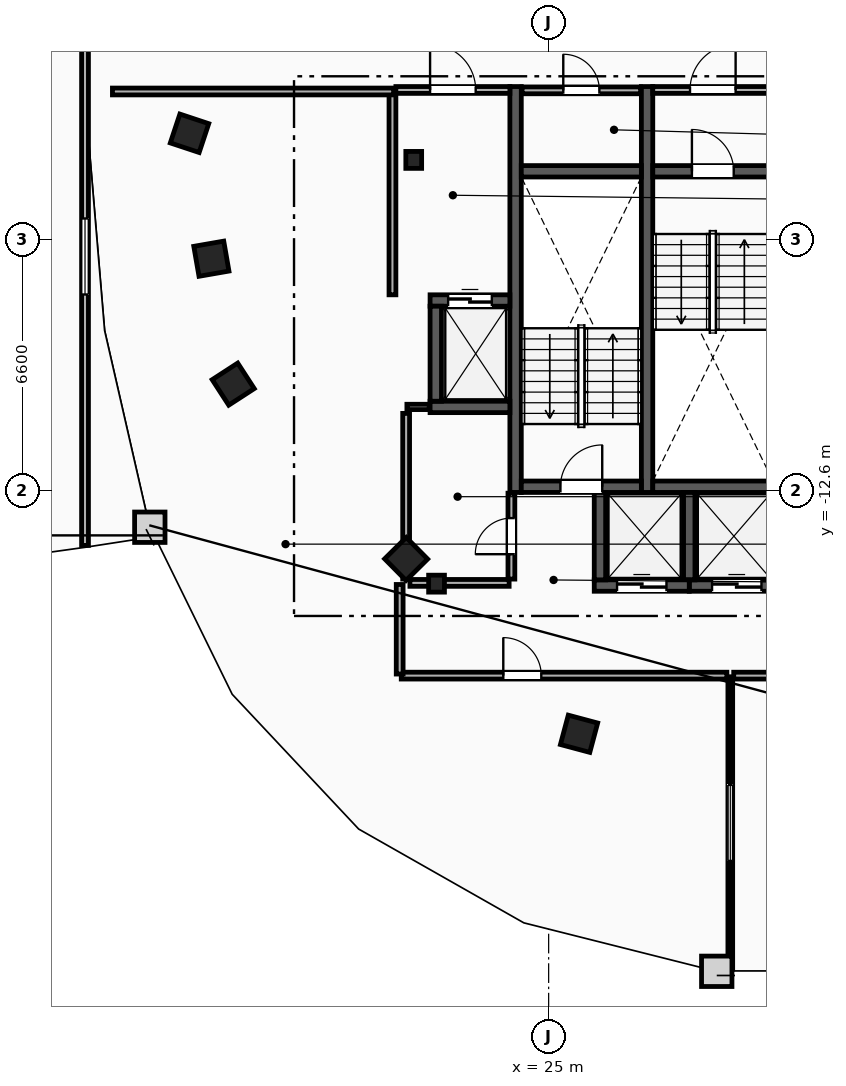
"""IFC4 building model, lengths in metres.
Left out: names, types, materials, properties, quantities, classifications, styles, units other than length and angle.
Written with IfcOpenShell. Run it as: python <this file> out.ifc"""

import sys

from ifc_helpers import new_model, si_unit, direction, frame, frame_2d, origin, origin_2d, place, context, subcontext, project, spatial, rectangle, i_section, extrude, element, fill, save


model = new_model("IFC4")
c1 = context("Model", 3, precision=1e-05, world=origin(), true_north=direction((0.0, 1.0)))
c2 = subcontext(c1, "Body", "Model", "MODEL_VIEW")
j1 = project(units=[si_unit("LENGTHUNIT", "METRE"), si_unit("PLANEANGLEUNIT", "RADIAN")], contexts=[c1])
p1 = place(None, origin())
s1 = spatial("IfcSite", under=j1, at=p1, CompositionType="ELEMENT")
p2 = place(p1, origin())
s2 = spatial("IfcBuilding", under=s1, at=p2, CompositionType="ELEMENT")
p3 = place(p2, frame((0.0, 0.0, 257.6)))
s3 = spatial("IfcBuildingStorey", under=s2, at=p3, CompositionType="ELEMENT", Elevation=257.6)
for number, where, z_axis, x_axis in (
    (1, (21.45, -3.9, 0.0), (0.0, 0.0, 1.0), (1.0, 0.0, 0.0)),
    (2, (22.05, -15.05, 0.0), (0.0, 0.0, 1.0), (1.0, 0.0, 0.0)),
):
    element("IfcColumn", number, at=place(p3, frame(where, z_axis=z_axis, x_axis=x_axis)), inside=s3, PredefinedType="COLUMN", context=c2, shape_type="SweptSolid", body=[
        extrude(i_section(OverallWidth=0.416, OverallDepth=0.446, WebThickness=0.039, FlangeThickness=0.063, FilletRadius=0.018, at=origin_2d()), origin(), (0.0, 0.0, 1.0), 3.6),
    ])
for number, where, z_axis, x_axis in (
    (3, (15.55, -3.2, 0.0), (0.0, 0.0, 1.0), (-0.315, -0.949, 0.0)),
    (4, (16.125, -6.5, 0.0), (0.0, 0.0, 1.0), (0.172, -0.985, 0.0)),
    (5, (16.7, -9.8, 0.0), (0.0, 0.0, 1.0), (0.544, -0.839, 0.0)),
    (6, (21.25, -14.4, 0.0), (0.0, 0.0, 1.0), (0.703, -0.711, 0.0)),
    (7, (25.8, -19.0, 0.0), (0.0, 0.0, 1.0), (0.966, -0.259, 0.0)),
):
    element("IfcColumn", number, at=place(p3, frame(where, z_axis=z_axis, x_axis=x_axis)), inside=s3, PredefinedType="COLUMN", context=c2, shape_type="SweptSolid", body=[
        extrude(rectangle(XDim=0.8, YDim=0.8, at=origin_2d()), origin(), (0.0, 0.0, 1.0), 3.6),
    ])
for number, where, z_axis, x_axis in (
    (8, (27.59, -12.65, 0.0), (0.0, 0.0, 1.0), (0.0, 1.0, 0.0)),
    (9, (24.13, -12.65, 0.0), (0.0, 0.0, 1.0), (0.0, 1.0, 0.0)),
):
    element("IfcWall", number, at=place(p3, frame(where, z_axis=z_axis, x_axis=x_axis)), inside=s3, PredefinedType="SHEAR", context=c2, shape_type="SweptSolid", body=[
        extrude(rectangle(XDim=10.68, YDim=0.3, at=frame_2d((5.34, 0.0))), origin(), (0.0, 0.0, 1.0), 3.34),
    ])
p4 = place(p3, frame((27.74, -4.2, 0.0), z_axis=(0.0, 0.0, 1.0), x_axis=(1.0, 0.0, 0.0)))
e10 = element("IfcWall", 10, at=p4, inside=s3, PredefinedType="SHEAR", context=c2, shape_type="SweptSolid", body=[
    extrude(rectangle(XDim=3.16, YDim=0.3, at=frame_2d((1.58, 0.0))), origin(), (0.0, 0.0, 1.0), 3.34),
])
p5 = place(p4, frame((1.03, 0.0, 0.0)))
e11 = element("IfcOpeningElement", 11, at=p5, cuts=e10, PredefinedType="OPENING", context=c2, shape_type="SweptSolid", body=[
    extrude(rectangle(XDim=1.1, YDim=2.15, at=frame_2d((0.55, 1.075))), frame((0.0, 0.16, 0.0), z_axis=(0.0, -1.0, 0.0), x_axis=(1.0, 0.0, 0.0)), (0.0, 0.0, 1.0), 0.32),
])
p6 = place(p3, frame((27.74, -12.5, 0.0), z_axis=(0.0, 0.0, 1.0), x_axis=(1.0, 0.0, 0.0)))
e12 = element("IfcWall", 12, at=p6, inside=s3, PredefinedType="SHEAR", context=c2, shape_type="SweptSolid", body=[
    extrude(rectangle(XDim=3.16, YDim=0.3, at=frame_2d((1.58, 0.0))), origin(), (0.0, 0.0, 1.0), 3.34),
])
p7 = place(p3, frame((24.28, -12.5, 0.0), z_axis=(0.0, 0.0, 1.0), x_axis=(1.0, 0.0, 0.0)))
e13 = element("IfcWall", 13, at=p7, inside=s3, PredefinedType="SHEAR", context=c2, shape_type="SweptSolid", body=[
    extrude(rectangle(XDim=3.16, YDim=0.3, at=frame_2d((1.58, 0.0))), origin(), (0.0, 0.0, 1.0), 3.34),
])
p8 = place(p7, frame((1.03, 0.0, 0.0)))
e14 = element("IfcOpeningElement", 14, at=p8, cuts=e13, PredefinedType="OPENING", context=c2, shape_type="SweptSolid", body=[
    extrude(rectangle(XDim=1.1, YDim=2.15, at=frame_2d((0.55, 1.075))), frame((0.0, 0.16, 0.0), z_axis=(0.0, -1.0, 0.0), x_axis=(1.0, 0.0, 0.0)), (0.0, 0.0, 1.0), 0.32),
])
p9 = place(p3, frame((24.28, -4.2, 0.0), z_axis=(0.0, 0.0, 1.0), x_axis=(1.0, 0.0, 0.0)))
e15 = element("IfcWall", 15, at=p9, inside=s3, PredefinedType="SHEAR", context=c2, shape_type="SweptSolid", body=[
    extrude(rectangle(XDim=3.16, YDim=0.3, at=frame_2d((1.58, 0.0))), origin(), (0.0, 0.0, 1.0), 3.34),
])
p10 = place(p3, frame((20.89, -7.45, 0.0), z_axis=(0.0, 0.0, 1.0), x_axis=(0.0, 1.0, 0.0)))
e16 = element("IfcWall", 16, at=p10, inside=s3, PredefinedType="PARTITIONING", context=c2, shape_type="SweptSolid", body=[
    extrude(rectangle(XDim=5.3, YDim=0.18, at=frame_2d((2.65, 0.0))), origin(), (0.0, 0.0, 1.0), 3.34),
])
p11 = place(p3, frame((20.98, -2.06, 0.0), z_axis=(0.0, 0.0, 1.0), x_axis=(1.0, 0.0, 0.0)))
e17 = element("IfcWall", 17, at=p11, inside=s3, PredefinedType="PARTITIONING", context=c2, shape_type="SweptSolid", body=[
    extrude(rectangle(XDim=3.0, YDim=0.18, at=frame_2d((1.5, 0.0))), origin(), (0.0, 0.0, 1.0), 3.34),
])
p12 = place(p11, frame((0.9, 0.0, 0.0)))
e18 = element("IfcOpeningElement", 18, at=p12, cuts=e17, PredefinedType="OPENING", context=c2, shape_type="SweptSolid", body=[
    extrude(rectangle(XDim=1.2, YDim=2.15, at=frame_2d((0.6, 1.075))), frame((0.0, 0.1, 0.0), z_axis=(0.0, -1.0, 0.0), x_axis=(1.0, 0.0, 0.0)), (0.0, 0.0, 1.0), 0.2),
])
p13 = place(p3, frame((27.74, -2.06, 0.0), z_axis=(0.0, 0.0, 1.0), x_axis=(1.0, 0.0, 0.0)))
e19 = element("IfcWall", 19, at=p13, inside=s3, PredefinedType="PARTITIONING", context=c2, shape_type="SweptSolid", body=[
    extrude(rectangle(XDim=3.16, YDim=0.18, at=frame_2d((1.58, 0.0))), origin(), (0.0, 0.0, 1.0), 3.34),
])
p14 = place(p13, frame((0.98, 0.0, 0.0)))
e20 = element("IfcOpeningElement", 20, at=p14, cuts=e19, PredefinedType="OPENING", context=c2, shape_type="SweptSolid", body=[
    extrude(rectangle(XDim=1.2, YDim=2.15, at=frame_2d((0.6, 1.075))), frame((0.0, 0.1, 0.0), z_axis=(0.0, -1.0, 0.0), x_axis=(1.0, 0.0, 0.0)), (0.0, 0.0, 1.0), 0.2),
])
p15 = place(p3, frame((21.88, -7.6, 0.0), z_axis=(0.0, 0.0, 1.0), x_axis=(1.0, 0.0, 0.0)))
e21 = element("IfcWall", 21, at=p15, inside=s3, PredefinedType="SHEAR", context=c2, shape_type="SweptSolid", body=[
    extrude(rectangle(XDim=2.1, YDim=0.3, at=frame_2d((1.05, 0.0))), origin(), (0.0, 0.0, 1.0), 3.34),
])
p16 = place(p15, frame((0.475, 0.0, 0.0)))
e22 = element("IfcOpeningElement", 22, at=p16, cuts=e21, PredefinedType="OPENING", context=c2, shape_type="SweptSolid", body=[
    extrude(rectangle(XDim=1.15, YDim=2.2, at=frame_2d((0.575, 1.1))), frame((0.0, 0.16, 0.0), z_axis=(0.0, -1.0, 0.0), x_axis=(1.0, 0.0, 0.0)), (0.0, 0.0, 1.0), 0.32),
])
p17 = place(p3, frame((21.88, -10.4, 0.0), z_axis=(0.0, 0.0, 1.0), x_axis=(1.0, 0.0, 0.0)))
e23 = element("IfcWall", 23, at=p17, inside=s3, PredefinedType="SHEAR", context=c2, shape_type="SweptSolid", body=[
    extrude(rectangle(XDim=2.1, YDim=0.3, at=frame_2d((1.05, 0.0))), origin(), (0.0, 0.0, 1.0), 3.34),
])
p18 = place(p3, frame((22.03, -10.25, 0.0), z_axis=(0.0, 0.0, 1.0), x_axis=(0.0, 1.0, 0.0)))
e24 = element("IfcWall", 24, at=p18, inside=s3, PredefinedType="SHEAR", context=c2, shape_type="SweptSolid", body=[
    extrude(rectangle(XDim=2.5, YDim=0.3, at=frame_2d((1.25, 0.0))), origin(), (0.0, 0.0, 1.0), 3.34),
])
p19 = place(p3, frame((28.7, -15.1, 0.0), z_axis=(0.0, 0.0, 1.0), x_axis=(1.0, 0.0, 0.0)))
e25 = element("IfcWall", 25, at=p19, inside=s3, PredefinedType="SHEAR", context=c2, shape_type="SweptSolid", body=[
    extrude(rectangle(XDim=2.5, YDim=0.3, at=frame_2d((1.25, 0.0))), origin(), (0.0, 0.0, 1.0), 3.34),
])
p20 = place(p19, frame((0.6, 0.0, 0.0)))
e26 = element("IfcOpeningElement", 26, at=p20, cuts=e25, PredefinedType="OPENING", context=c2, shape_type="SweptSolid", body=[
    extrude(rectangle(XDim=1.3, YDim=2.2, at=frame_2d((0.65, 1.1))), frame((0.0, 0.16, 0.0), z_axis=(0.0, -1.0, 0.0), x_axis=(1.0, 0.0, 0.0)), (0.0, 0.0, 1.0), 0.32),
])
p21 = place(p3, frame((28.7, -14.95, 0.0), z_axis=(0.0, 0.0, 1.0), x_axis=(0.0, 1.0, 0.0)))
e27 = element("IfcWall", 27, at=p21, inside=s3, PredefinedType="SHEAR", context=c2, shape_type="SweptSolid", body=[
    extrude(rectangle(XDim=2.3, YDim=0.3, at=frame_2d((1.15, 0.0))), origin(), (0.0, 0.0, 1.0), 3.34),
])
p22 = place(p3, frame((26.2, -15.1, 0.0), z_axis=(0.0, 0.0, 1.0), x_axis=(1.0, 0.0, 0.0)))
e28 = element("IfcWall", 28, at=p22, inside=s3, PredefinedType="SHEAR", context=c2, shape_type="SweptSolid", body=[
    extrude(rectangle(XDim=2.5, YDim=0.3, at=frame_2d((1.25, 0.0))), origin(), (0.0, 0.0, 1.0), 3.34),
])
p23 = place(p22, frame((0.6, 0.0, 0.0)))
e29 = element("IfcOpeningElement", 29, at=p23, cuts=e28, PredefinedType="OPENING", context=c2, shape_type="SweptSolid", body=[
    extrude(rectangle(XDim=1.3, YDim=2.2, at=frame_2d((0.65, 1.1))), frame((0.0, 0.16, 0.0), z_axis=(0.0, -1.0, 0.0), x_axis=(1.0, 0.0, 0.0)), (0.0, 0.0, 1.0), 0.32),
])
p24 = place(p3, frame((26.35, -14.95, 0.0), z_axis=(0.0, 0.0, 1.0), x_axis=(0.0, 1.0, 0.0)))
e30 = element("IfcWall", 30, at=p24, inside=s3, PredefinedType="SHEAR", context=c2, shape_type="SweptSolid", body=[
    extrude(rectangle(XDim=2.3, YDim=0.3, at=frame_2d((1.15, 0.0))), origin(), (0.0, 0.0, 1.0), 3.34),
])
p25 = place(p3, frame((21.27, -10.4, 0.0), z_axis=(0.0, 0.0, 1.0), x_axis=(1.0, 0.0, 0.0)))
e31 = element("IfcWall", 31, at=p25, inside=s3, PredefinedType="PARTITIONING", context=c2, shape_type="SweptSolid", body=[
    extrude(rectangle(XDim=0.59, YDim=0.14, at=frame_2d((0.295, 0.0))), origin(), (0.0, 0.0, 1.0), 3.34),
])
p26 = place(p3, frame((21.25, -14.93, 0.0), z_axis=(0.0, 0.0, 1.0), x_axis=(0.0, 1.0, 0.0)))
e32 = element("IfcWall", 32, at=p26, inside=s3, PredefinedType="PARTITIONING", context=c2, shape_type="SweptSolid", body=[
    extrude(rectangle(XDim=4.36, YDim=0.18, at=frame_2d((2.18, 0.0))), origin(), (0.0, 0.0, 1.0), 3.34),
])
p27 = place(p3, frame((21.35, -15.03, 0.0), z_axis=(0.0, 0.0, 1.0), x_axis=(1.0, 0.0, 0.0)))
e33 = element("IfcWall", 33, at=p27, inside=s3, PredefinedType="PARTITIONING", context=c2, shape_type="SweptSolid", body=[
    extrude(rectangle(XDim=2.61, YDim=0.18, at=frame_2d((1.305, 0.0))), origin(), (0.0, 0.0, 1.0), 2.413),
])
p28 = place(p3, frame((24.3, -2.07, 0.0), z_axis=(0.0, 0.0, 1.0), x_axis=(1.0, 0.0, 0.0)))
e34 = element("IfcWall", 34, at=p28, inside=s3, PredefinedType="PARTITIONING", context=c2, shape_type="SweptSolid", body=[
    extrude(rectangle(XDim=3.12, YDim=0.18, at=frame_2d((1.56, 0.0))), origin(), (0.0, 0.0, 1.0), 3.34),
])
p29 = place(p28, frame((1.085, 0.0, 0.0)))
e35 = element("IfcOpeningElement", 35, at=p29, cuts=e34, PredefinedType="OPENING", context=c2, shape_type="SweptSolid", body=[
    extrude(rectangle(XDim=0.95, YDim=2.1, at=frame_2d((0.475, 1.05))), frame((0.0, 0.1, 0.0), z_axis=(0.0, -1.0, 0.0), x_axis=(1.0, 0.0, 0.0)), (0.0, 0.0, 1.0), 0.2),
])
p30 = place(p3, frame((24.02, -14.93, 0.0), z_axis=(0.0, 0.0, 1.0), x_axis=(0.0, 1.0, 0.0)))
e36 = element("IfcWall", 36, at=p30, inside=s3, PredefinedType="PARTITIONING", context=c2, shape_type="SweptSolid", body=[
    extrude(rectangle(XDim=2.26, YDim=0.18, at=frame_2d((1.13, 0.0))), origin(), (0.0, 0.0, 1.0), 3.34),
])
p31 = place(p30, frame((0.655, 0.0, 0.0)))
e37 = element("IfcOpeningElement", 37, at=p31, cuts=e36, PredefinedType="OPENING", context=c2, shape_type="SweptSolid", body=[
    extrude(rectangle(XDim=0.95, YDim=2.1, at=frame_2d((0.475, 1.05))), frame((0.0, 0.1, 0.0), z_axis=(0.0, -1.0, 0.0), x_axis=(1.0, 0.0, 0.0)), (0.0, 0.0, 1.0), 0.2),
])
p32 = place(p3, frame((29.78, -25.19, 0.0), z_axis=(0.0, 0.0, 1.0), x_axis=(0.0, 1.0, 0.0)))
e38 = element("IfcWall", 38, at=p32, inside=s3, PredefinedType="PARTITIONING", context=c2, shape_type="SweptSolid", body=[
    extrude(rectangle(XDim=7.69, YDim=0.125, at=frame_2d((3.845, 0.0))), origin(), (0.0, 0.0, 1.0), 3.34),
])
p33 = place(p32, frame((2.845, 0.0, 1.05)))
e39 = element("IfcOpeningElement", 39, at=p33, cuts=e38, PredefinedType="OPENING", context=c2, shape_type="SweptSolid", body=[
    extrude(rectangle(XDim=2.0, YDim=1.5, at=frame_2d((1.0, 0.75))), frame((0.0, 0.073, 0.0), z_axis=(0.0, -1.0, 0.0), x_axis=(1.0, 0.0, 0.0)), (0.0, 0.0, 1.0), 0.145),
])
p34 = place(p3, frame((29.87, -17.47, 0.0), z_axis=(0.0, 0.0, 1.0), x_axis=(1.0, 0.0, 0.0)))
e40 = element("IfcWall", 40, at=p34, inside=s3, PredefinedType="PARTITIONING", context=c2, shape_type="SweptSolid", body=[
    extrude(rectangle(XDim=3.758, YDim=0.18, at=frame_2d((1.879, 0.0))), origin(), (0.0, 0.0, 1.0), 3.34),
])
p35 = place(p3, frame((21.122, -17.47, 0.0), z_axis=(0.0, 0.0, 1.0), x_axis=(1.0, 0.0, 0.0)))
e41 = element("IfcWall", 41, at=p35, inside=s3, PredefinedType="PARTITIONING", context=c2, shape_type="SweptSolid", body=[
    extrude(rectangle(XDim=8.568, YDim=0.18, at=frame_2d((4.284, 0.0))), origin(), (0.0, 0.0, 1.0), 3.34),
])
p36 = place(p35, frame((2.685, 0.0, 0.0)))
e42 = element("IfcOpeningElement", 42, at=p36, cuts=e41, PredefinedType="OPENING", context=c2, shape_type="SweptSolid", body=[
    extrude(rectangle(XDim=1.0, YDim=2.15, at=frame_2d((0.5, 1.075))), frame((0.0, 0.1, 0.0), z_axis=(0.0, -1.0, 0.0), x_axis=(1.0, 0.0, 0.0)), (0.0, 0.0, 1.0), 0.2),
])
p37 = place(p3, frame((13.521, -2.1, 0.0), z_axis=(0.0, 0.0, 1.0), x_axis=(1.0, 0.0, 0.0)))
e43 = element("IfcWall", 43, at=p37, inside=s3, PredefinedType="PARTITIONING", context=c2, shape_type="SweptSolid", body=[
    extrude(rectangle(XDim=7.398, YDim=0.18, at=frame_2d((3.699, 0.0))), origin(), (0.0, 0.0, 1.0), 3.34),
])
p38 = place(p3, frame((21.08, -15.072, 0.0), z_axis=(0.0, 0.0, 1.0), x_axis=(0.0, -1.0, 0.0)))
e44 = element("IfcWall", 44, at=p38, inside=s3, PredefinedType="PARTITIONING", context=c2, shape_type="SweptSolid", body=[
    extrude(rectangle(XDim=2.357, YDim=0.18, at=frame_2d((1.178, 0.0))), origin(), (0.0, 0.0, 1.0), 3.34),
])
p39 = place(p3, frame((12.8, -14.044, 0.0), z_axis=(0.0, 0.0, 1.0), x_axis=(0.0, 1.0, 0.0)))
e45 = element("IfcWall", 45, at=p39, inside=s3, PredefinedType="PARTITIONING", context=c2, shape_type="SweptSolid", body=[
    extrude(rectangle(XDim=15.204, YDim=0.18, at=frame_2d((7.602, 0.0))), origin(), (0.0, 0.0, 1.0), 3.34),
])
p40 = place(p39, frame((6.602, 0.0, 1.05)))
e46 = element("IfcOpeningElement", 46, at=p40, cuts=e45, PredefinedType="OPENING", context=c2, shape_type="SweptSolid", body=[
    extrude(rectangle(XDim=2.0, YDim=1.5, at=frame_2d((1.0, 0.75))), frame((0.0, 0.1, 0.0), z_axis=(0.0, -1.0, 0.0), x_axis=(1.0, 0.0, 0.0)), (0.0, 0.0, 1.0), 0.2),
])
p41 = place(p5, origin())
e47 = element("IfcDoor", 47, at=p41, inside=s3, OperationType="SINGLE_SWING_LEFT", PredefinedType="DOOR", context=c2, shape_type="SweptSolid", body=[
    extrude(rectangle(XDim=1.1, YDim=2.15, at=frame_2d((0.55, 1.075))), frame((0.0, 0.025, 0.0), z_axis=(0.0, -1.0, 0.0), x_axis=(1.0, 0.0, 0.0)), (0.0, 0.0, 1.0), 0.05),
])
fill(e11, e47)
p42 = place(p8, origin())
e48 = element("IfcDoor", 48, at=p42, inside=s3, OperationType="SINGLE_SWING_RIGHT", PredefinedType="DOOR", context=c2, shape_type="SweptSolid", body=[
    extrude(rectangle(XDim=1.1, YDim=2.15, at=frame_2d((0.55, 1.075))), frame((0.0, 0.025, 0.0), z_axis=(0.0, -1.0, 0.0), x_axis=(1.0, 0.0, 0.0)), (0.0, 0.0, 1.0), 0.05),
])
fill(e14, e48)
p43 = place(p12, origin())
e49 = element("IfcDoor", 49, at=p43, inside=s3, OperationType="SINGLE_SWING_LEFT", PredefinedType="DOOR", context=c2, shape_type="SweptSolid", body=[
    extrude(rectangle(XDim=1.2, YDim=2.15, at=frame_2d((0.6, 1.075))), frame((0.0, 0.025, 0.0), z_axis=(0.0, -1.0, 0.0), x_axis=(1.0, 0.0, 0.0)), (0.0, 0.0, 1.0), 0.05),
])
fill(e18, e49)
p44 = place(p14, origin())
e50 = element("IfcDoor", 50, at=p44, inside=s3, OperationType="SINGLE_SWING_RIGHT", PredefinedType="DOOR", context=c2, shape_type="SweptSolid", body=[
    extrude(rectangle(XDim=1.2, YDim=2.15, at=frame_2d((0.6, 1.075))), frame((0.0, 0.025, 0.0), z_axis=(0.0, -1.0, 0.0), x_axis=(1.0, 0.0, 0.0)), (0.0, 0.0, 1.0), 0.05),
])
fill(e20, e50)
p45 = place(p16, origin())
e51 = element("IfcDoor", 51, at=p45, inside=s3, OperationType="SLIDING_TO_LEFT", PredefinedType="TRAPDOOR", context=c2, shape_type="SweptSolid", body=[
    extrude(rectangle(XDim=1.15, YDim=2.2, at=frame_2d((0.575, 1.1))), frame((0.0, 0.025, 0.0), z_axis=(0.0, -1.0, 0.0), x_axis=(1.0, 0.0, 0.0)), (0.0, 0.0, 1.0), 0.05),
])
fill(e22, e51)
p46 = place(p20, origin())
e52 = element("IfcDoor", 52, at=p46, inside=s3, OperationType="SLIDING_TO_LEFT", PredefinedType="TRAPDOOR", context=c2, shape_type="SweptSolid", body=[
    extrude(rectangle(XDim=1.3, YDim=2.2, at=frame_2d((0.65, 1.1))), frame((0.0, 0.025, 0.0), z_axis=(0.0, -1.0, 0.0), x_axis=(1.0, 0.0, 0.0)), (0.0, 0.0, 1.0), 0.05),
])
fill(e26, e52)
p47 = place(p23, origin())
e53 = element("IfcDoor", 53, at=p47, inside=s3, OperationType="SLIDING_TO_LEFT", PredefinedType="TRAPDOOR", context=c2, shape_type="SweptSolid", body=[
    extrude(rectangle(XDim=1.3, YDim=2.2, at=frame_2d((0.65, 1.1))), frame((0.0, 0.025, 0.0), z_axis=(0.0, -1.0, 0.0), x_axis=(1.0, 0.0, 0.0)), (0.0, 0.0, 1.0), 0.05),
])
fill(e29, e53)
p48 = place(p36, origin())
e54 = element("IfcDoor", 54, at=p48, inside=s3, OperationType="SINGLE_SWING_LEFT", PredefinedType="DOOR", context=c2, shape_type="SweptSolid", body=[
    extrude(rectangle(XDim=1.0, YDim=2.15, at=frame_2d((0.5, 1.075))), frame((0.0, 0.025, 0.0), z_axis=(0.0, -1.0, 0.0), x_axis=(1.0, 0.0, 0.0)), (0.0, 0.0, 1.0), 0.05),
])
fill(e42, e54)
p49 = place(p29, origin())
e55 = element("IfcDoor", 55, at=p49, inside=s3, OperationType="SINGLE_SWING_LEFT", PredefinedType="DOOR", context=c2, shape_type="SweptSolid", body=[
    extrude(rectangle(XDim=0.95, YDim=2.1, at=frame_2d((0.475, 1.05))), frame((0.0, 0.025, 0.0), z_axis=(0.0, -1.0, 0.0), x_axis=(1.0, 0.0, 0.0)), (0.0, 0.0, 1.0), 0.05),
])
fill(e35, e55)
p50 = place(p31, origin())
e56 = element("IfcDoor", 56, at=p50, inside=s3, OperationType="SINGLE_SWING_LEFT", PredefinedType="DOOR", context=c2, shape_type="SweptSolid", body=[
    extrude(rectangle(XDim=0.95, YDim=2.1, at=frame_2d((0.475, 1.05))), frame((0.0, 0.025, 0.0), z_axis=(0.0, -1.0, 0.0), x_axis=(1.0, 0.0, 0.0)), (0.0, 0.0, 1.0), 0.05),
])
fill(e37, e56)
p51 = place(p33, origin())
e57 = element("IfcWindow", 57, at=p51, inside=s3, PartitioningType="SINGLE_PANEL", PredefinedType="WINDOW", context=c2, shape_type="SweptSolid", body=[
    extrude(rectangle(XDim=2.0, YDim=1.5, at=frame_2d((1.0, 0.75))), frame((0.0, 0.03, 0.0), z_axis=(0.0, -1.0, 0.0), x_axis=(1.0, 0.0, 0.0)), (0.0, 0.0, 1.0), 0.06),
])
fill(e39, e57)
p52 = place(p40, origin())
e58 = element("IfcWindow", 58, at=p52, inside=s3, PartitioningType="SINGLE_PANEL", PredefinedType="WINDOW", context=c2, shape_type="SweptSolid", body=[
    extrude(rectangle(XDim=2.0, YDim=1.5, at=frame_2d((1.0, 0.75))), frame((0.0, 0.03, 0.0), z_axis=(0.0, -1.0, 0.0), x_axis=(1.0, 0.0, 0.0)), (0.0, 0.0, 1.0), 0.06),
])
fill(e46, e58)
save(model, sys.argv[1])
